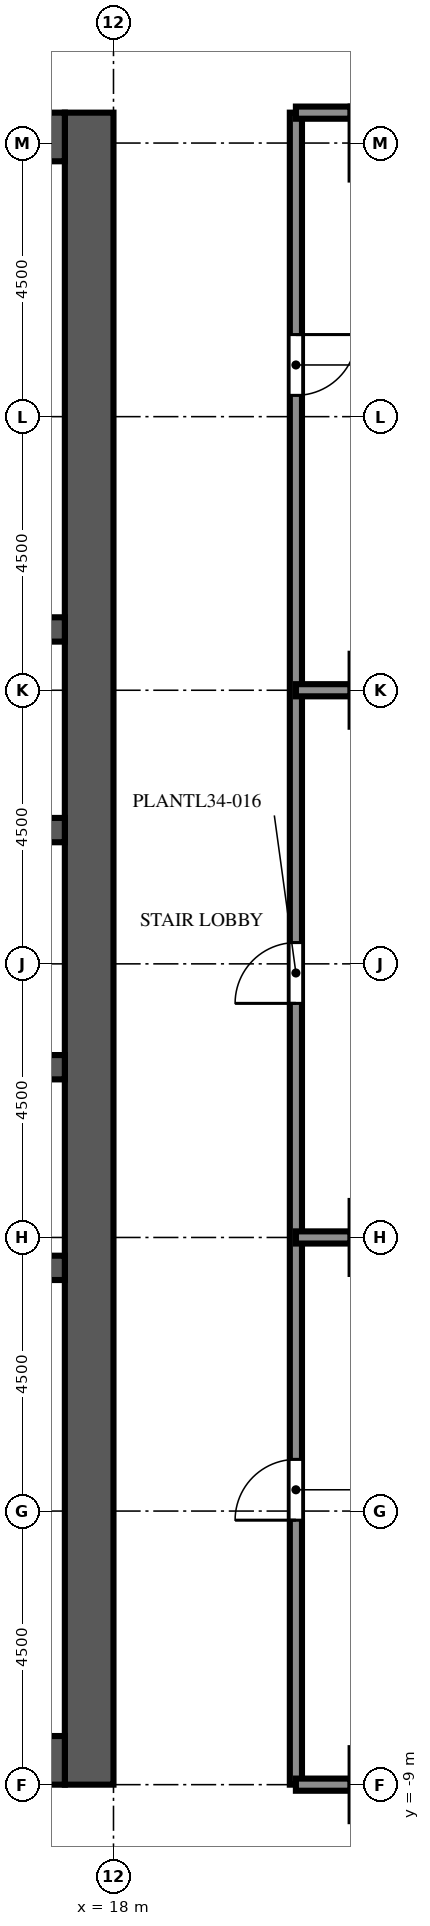
"""IFC4 building model, lengths in metres.
Left out: names, types, materials, properties, quantities, classifications, styles, units other than length and angle.
Written with IfcOpenShell. Run it as: python <this file> out.ifc"""

import sys

from ifc_helpers import new_model, si_unit, direction, frame, frame_2d, origin, place, context, subcontext, project, spatial, rectangle, extrude, element, fill, save


model = new_model("IFC4")
c1 = context("Model", 3, precision=1e-05, world=origin(), true_north=direction((0.0, 1.0)))
c2 = subcontext(c1, "Body", "Model", "MODEL_VIEW")
j1 = project(units=[si_unit("LENGTHUNIT", "METRE"), si_unit("PLANEANGLEUNIT", "RADIAN")], contexts=[c1])
p1 = place(None, origin())
s1 = spatial("IfcSite", under=j1, at=p1, CompositionType="ELEMENT")
p2 = place(p1, origin())
s2 = spatial("IfcBuilding", under=s1, at=p2, CompositionType="ELEMENT")
p3 = place(p2, frame((0.0, 0.0, 151.4)))
s3 = spatial("IfcBuildingStorey", under=s2, at=p3, CompositionType="ELEMENT", Elevation=151.4)
p4 = place(p3, frame((17.6, -9.0, 0.0), z_axis=(0.0, 0.0, 1.0), x_axis=(0.0, 1.0, 0.0)))
e1 = element("IfcWall", 1, at=p4, inside=s3, PredefinedType="SHEAR", context=c2, shape_type="SweptSolid", body=[
    extrude(rectangle(XDim=27.5, YDim=0.8, at=frame_2d((13.75, 0.0))), origin(), (0.0, 0.0, 1.0), 5.4),
])
p5 = place(p4, frame((12.55, 0.0, 0.0)))
e2 = element("IfcOpeningElement", 2, at=p5, cuts=e1, PredefinedType="OPENING", context=c2, shape_type="SweptSolid", body=[
    extrude(rectangle(XDim=2.4, YDim=2.4, at=frame_2d((1.2, 1.2))), frame((0.0, 0.41, 0.0), z_axis=(0.0, -1.0, 0.0), x_axis=(1.0, 0.0, 0.0)), (0.0, 0.0, 1.0), 0.82),
])
p6 = place(p4, frame((6.825, 0.0, 0.0)))
e3 = element("IfcOpeningElement", 3, at=p6, cuts=e1, PredefinedType="OPENING", context=c2, shape_type="SweptSolid", body=[
    extrude(rectangle(XDim=1.2, YDim=2.1, at=frame_2d((0.6, 1.05))), frame((0.0, 0.41, 0.0), z_axis=(0.0, -1.0, 0.0), x_axis=(1.0, 0.0, 0.0)), (0.0, 0.0, 1.0), 0.82),
])
p7 = place(p4, frame((19.475, 0.0, 0.0)))
e4 = element("IfcOpeningElement", 4, at=p7, cuts=e1, PredefinedType="OPENING", context=c2, shape_type="SweptSolid", body=[
    extrude(rectangle(XDim=1.2, YDim=2.1, at=frame_2d((0.6, 1.05))), frame((0.0, 0.41, 0.0), z_axis=(0.0, -1.0, 0.0), x_axis=(1.0, 0.0, 0.0)), (0.0, 0.0, 1.0), 0.82),
])
for number, where, z_axis, x_axis in (
    (5, (6.8, -8.6, 0.0), (0.0, 0.0, 1.0), (1.0, 0.0, 0.0)),
    (6, (6.8, 18.1, 0.0), (0.0, 0.0, 1.0), (1.0, 0.0, 0.0)),
):
    element("IfcWall", number, at=place(p3, frame(where, z_axis=z_axis, x_axis=x_axis)), inside=s3, PredefinedType="SHEAR", context=c2, shape_type="SweptSolid", body=[
        extrude(rectangle(XDim=10.4, YDim=0.8, at=frame_2d((5.2, 0.0))), origin(), (0.0, 0.0, 1.0), 5.4),
    ])
p8 = place(p3, frame((6.8, -0.5, 0.0), z_axis=(0.0, 0.0, 1.0), x_axis=(1.0, 0.0, 0.0)))
e7 = element("IfcWall", 7, at=p8, inside=s3, PredefinedType="SHEAR", context=c2, shape_type="SweptSolid", body=[
    extrude(rectangle(XDim=10.4, YDim=0.4, at=frame_2d((5.2, 0.0))), origin(), (0.0, 0.0, 1.0), 5.4),
])
p9 = place(p3, frame((6.8, 2.8, 0.0), z_axis=(0.0, 0.0, 1.0), x_axis=(1.0, 0.0, 0.0)))
e8 = element("IfcWall", 8, at=p9, inside=s3, PredefinedType="SHEAR", context=c2, shape_type="SweptSolid", body=[
    extrude(rectangle(XDim=10.4, YDim=0.4, at=frame_2d((5.2, 0.0))), origin(), (0.0, 0.0, 1.0), 5.4),
])
p10 = place(p9, frame((0.738, 0.0, 0.0)))
e9 = element("IfcOpeningElement", 9, at=p10, cuts=e8, PredefinedType="OPENING", context=c2, shape_type="SweptSolid", body=[
    extrude(rectangle(XDim=1.1, YDim=2.1, at=frame_2d((0.55, 1.05))), frame((0.0, 0.21, 0.0), z_axis=(0.0, -1.0, 0.0), x_axis=(1.0, 0.0, 0.0)), (0.0, 0.0, 1.0), 0.42),
])
p11 = place(p9, frame((3.337, 0.0, 0.0)))
e10 = element("IfcOpeningElement", 10, at=p11, cuts=e8, PredefinedType="OPENING", context=c2, shape_type="SweptSolid", body=[
    extrude(rectangle(XDim=1.1, YDim=2.1, at=frame_2d((0.55, 1.05))), frame((0.0, 0.21, 0.0), z_axis=(0.0, -1.0, 0.0), x_axis=(1.0, 0.0, 0.0)), (0.0, 0.0, 1.0), 0.42),
])
p12 = place(p9, frame((5.962, 0.0, 0.0)))
e11 = element("IfcOpeningElement", 11, at=p12, cuts=e8, PredefinedType="OPENING", context=c2, shape_type="SweptSolid", body=[
    extrude(rectangle(XDim=1.1, YDim=2.1, at=frame_2d((0.55, 1.05))), frame((0.0, 0.21, 0.0), z_axis=(0.0, -1.0, 0.0), x_axis=(1.0, 0.0, 0.0)), (0.0, 0.0, 1.0), 0.42),
])
p13 = place(p9, frame((8.613, 0.0, 0.0)))
e12 = element("IfcOpeningElement", 12, at=p13, cuts=e8, PredefinedType="OPENING", context=c2, shape_type="SweptSolid", body=[
    extrude(rectangle(XDim=1.0, YDim=2.1, at=frame_2d((0.5, 1.05))), frame((0.0, 0.21, 0.0), z_axis=(0.0, -1.0, 0.0), x_axis=(1.0, 0.0, 0.0)), (0.0, 0.0, 1.0), 0.42),
])
p14 = place(p3, frame((6.8, 6.7, 0.0), z_axis=(0.0, 0.0, 1.0), x_axis=(1.0, 0.0, 0.0)))
e13 = element("IfcWall", 13, at=p14, inside=s3, PredefinedType="SHEAR", context=c2, shape_type="SweptSolid", body=[
    extrude(rectangle(XDim=10.4, YDim=0.4, at=frame_2d((5.2, 0.0))), origin(), (0.0, 0.0, 1.0), 5.4),
])
p15 = place(p14, frame((3.337, 0.0, 0.0)))
e14 = element("IfcOpeningElement", 14, at=p15, cuts=e13, PredefinedType="OPENING", context=c2, shape_type="SweptSolid", body=[
    extrude(rectangle(XDim=1.1, YDim=2.1, at=frame_2d((0.55, 1.05))), frame((0.0, 0.21, 0.0), z_axis=(0.0, -1.0, 0.0), x_axis=(1.0, 0.0, 0.0)), (0.0, 0.0, 1.0), 0.42),
])
p16 = place(p14, frame((5.962, 0.0, 0.0)))
e15 = element("IfcOpeningElement", 15, at=p16, cuts=e13, PredefinedType="OPENING", context=c2, shape_type="SweptSolid", body=[
    extrude(rectangle(XDim=1.1, YDim=2.1, at=frame_2d((0.55, 1.05))), frame((0.0, 0.21, 0.0), z_axis=(0.0, -1.0, 0.0), x_axis=(1.0, 0.0, 0.0)), (0.0, 0.0, 1.0), 0.42),
])
p17 = place(p14, frame((8.663, 0.0, 0.0)))
e16 = element("IfcOpeningElement", 16, at=p17, cuts=e13, PredefinedType="OPENING", context=c2, shape_type="SweptSolid", body=[
    extrude(rectangle(XDim=1.1, YDim=2.1, at=frame_2d((0.55, 1.05))), frame((0.0, 0.21, 0.0), z_axis=(0.0, -1.0, 0.0), x_axis=(1.0, 0.0, 0.0)), (0.0, 0.0, 1.0), 0.42),
])
p18 = place(p14, frame((0.688, 0.0, 0.0)))
e17 = element("IfcOpeningElement", 17, at=p18, cuts=e13, PredefinedType="OPENING", context=c2, shape_type="SweptSolid", body=[
    extrude(rectangle(XDim=1.0, YDim=2.1, at=frame_2d((0.5, 1.05))), frame((0.0, 0.21, 0.0), z_axis=(0.0, -1.0, 0.0), x_axis=(1.0, 0.0, 0.0)), (0.0, 0.0, 1.0), 0.42),
])
p19 = place(p3, frame((6.8, 10.0, 0.0), z_axis=(0.0, 0.0, 1.0), x_axis=(1.0, 0.0, 0.0)))
e18 = element("IfcWall", 18, at=p19, inside=s3, PredefinedType="SHEAR", context=c2, shape_type="SweptSolid", body=[
    extrude(rectangle(XDim=10.4, YDim=0.4, at=frame_2d((5.2, 0.0))), origin(), (0.0, 0.0, 1.0), 5.4),
])
p20 = place(p3, frame((21.0, 18.5, 0.0), z_axis=(0.0, 0.0, 1.0), x_axis=(0.0, -1.0, 0.0)))
e19 = element("IfcWall", 19, at=p20, inside=s3, PredefinedType="PARTITIONING", context=c2, shape_type="SweptSolid", body=[
    extrude(rectangle(XDim=27.5, YDim=0.2, at=frame_2d((13.75, 0.0))), origin(), (0.0, 0.0, 1.0), 4.95),
])
p21 = place(p20, frame((22.15, 0.0, 0.0)))
e20 = element("IfcOpeningElement", 20, at=p21, cuts=e19, PredefinedType="OPENING", context=c2, shape_type="SweptSolid", body=[
    extrude(rectangle(XDim=1.0, YDim=2.1, at=frame_2d((0.5, 1.05))), frame((0.0, 0.11, 0.0), z_axis=(0.0, -1.0, 0.0), x_axis=(1.0, 0.0, 0.0)), (0.0, 0.0, 1.0), 0.22),
])
p22 = place(p20, frame((13.65, 0.0, 0.0)))
e21 = element("IfcOpeningElement", 21, at=p22, cuts=e19, PredefinedType="OPENING", context=c2, shape_type="SweptSolid", body=[
    extrude(rectangle(XDim=1.0, YDim=2.1, at=frame_2d((0.5, 1.05))), frame((0.0, 0.11, 0.0), z_axis=(0.0, -1.0, 0.0), x_axis=(1.0, 0.0, 0.0)), (0.0, 0.0, 1.0), 0.22),
])
p23 = place(p20, frame((3.65, 0.0, 0.0)))
e22 = element("IfcOpeningElement", 22, at=p23, cuts=e19, PredefinedType="OPENING", context=c2, shape_type="SweptSolid", body=[
    extrude(rectangle(XDim=1.0, YDim=2.1, at=frame_2d((0.5, 1.05))), frame((0.0, 0.11, 0.0), z_axis=(0.0, -1.0, 0.0), x_axis=(1.0, 0.0, 0.0)), (0.0, 0.0, 1.0), 0.22),
])
for number, where, z_axis, x_axis in (
    (23, (21.0, -9.0, 0.0), (0.0, 0.0, 1.0), (1.0, 0.0, 0.0)),
    (24, (21.0, 0.0, 0.0), (0.0, 0.0, 1.0), (1.0, 0.0, 0.0)),
    (25, (21.0, 9.0, 0.0), (0.0, 0.0, 1.0), (1.0, 0.0, 0.0)),
    (26, (21.0, 18.5, 0.0), (0.0, 0.0, 1.0), (1.0, 0.0, 0.0)),
):
    element("IfcWall", number, at=place(p3, frame(where, z_axis=z_axis, x_axis=x_axis)), inside=s3, PredefinedType="PARTITIONING", context=c2, shape_type="SweptSolid", body=[
        extrude(rectangle(XDim=0.9, YDim=0.2, at=frame_2d((0.45, 0.0))), origin(), (0.0, 0.0, 1.0), 4.95),
    ])
p24 = place(p5, origin())
e27 = element("IfcDoor", 27, at=p24, inside=s3, OperationType="DOUBLE_DOOR_DOUBLE_SWING", PredefinedType="DOOR", context=c2, shape_type="SweptSolid", body=[
    extrude(rectangle(XDim=2.4, YDim=2.4, at=frame_2d((1.2, 1.2))), frame((0.0, 0.025, 0.0), z_axis=(0.0, -1.0, 0.0), x_axis=(1.0, 0.0, 0.0)), (0.0, 0.0, 1.0), 0.05),
])
fill(e2, e27)
p25 = place(p6, frame((1.2, 0.0, 0.0), z_axis=(0.0, 0.0, 1.0), x_axis=(-1.0, 0.0, 0.0)))
e28 = element("IfcDoor", 28, at=p25, inside=s3, OperationType="SINGLE_SWING_LEFT", PredefinedType="DOOR", context=c2, shape_type="SweptSolid", body=[
    extrude(rectangle(XDim=1.2, YDim=2.1, at=frame_2d((0.6, 1.05))), frame((0.0, 0.025, 0.0), z_axis=(0.0, -1.0, 0.0), x_axis=(1.0, 0.0, 0.0)), (0.0, 0.0, 1.0), 0.05),
])
fill(e3, e28)
p26 = place(p7, frame((1.2, 0.0, 0.0), z_axis=(0.0, 0.0, 1.0), x_axis=(-1.0, 0.0, 0.0)))
e29 = element("IfcDoor", 29, at=p26, inside=s3, OperationType="SINGLE_SWING_LEFT", PredefinedType="DOOR", context=c2, shape_type="SweptSolid", body=[
    extrude(rectangle(XDim=1.2, YDim=2.1, at=frame_2d((0.6, 1.05))), frame((0.0, 0.025, 0.0), z_axis=(0.0, -1.0, 0.0), x_axis=(1.0, 0.0, 0.0)), (0.0, 0.0, 1.0), 0.05),
])
fill(e4, e29)
p27 = place(p21, origin())
e30 = element("IfcDoor", 30, at=p27, inside=s3, OperationType="SINGLE_SWING_RIGHT", PredefinedType="DOOR", context=c2, shape_type="SweptSolid", body=[
    extrude(rectangle(XDim=1.0, YDim=2.1, at=frame_2d((0.5, 1.05))), frame((0.0, 0.025, 0.0), z_axis=(0.0, -1.0, 0.0), x_axis=(1.0, 0.0, 0.0)), (0.0, 0.0, 1.0), 0.05),
])
fill(e20, e30)
p28 = place(p22, origin())
e31 = element("IfcDoor", 31, at=p28, inside=s3, OperationType="SINGLE_SWING_RIGHT", PredefinedType="DOOR", context=c2, shape_type="SweptSolid", body=[
    extrude(rectangle(XDim=1.0, YDim=2.1, at=frame_2d((0.5, 1.05))), frame((0.0, 0.025, 0.0), z_axis=(0.0, -1.0, 0.0), x_axis=(1.0, 0.0, 0.0)), (0.0, 0.0, 1.0), 0.05),
])
fill(e21, e31)
p29 = place(p23, origin())
e32 = element("IfcDoor", 32, at=p29, inside=s3, OperationType="SINGLE_SWING_LEFT", PredefinedType="DOOR", context=c2, shape_type="SweptSolid", body=[
    extrude(rectangle(XDim=1.0, YDim=2.1, at=frame_2d((0.5, 1.05))), frame((0.0, 0.025, 0.0), z_axis=(0.0, -1.0, 0.0), x_axis=(1.0, 0.0, 0.0)), (0.0, 0.0, 1.0), 0.05),
])
fill(e22, e32)
save(model, sys.argv[1])
